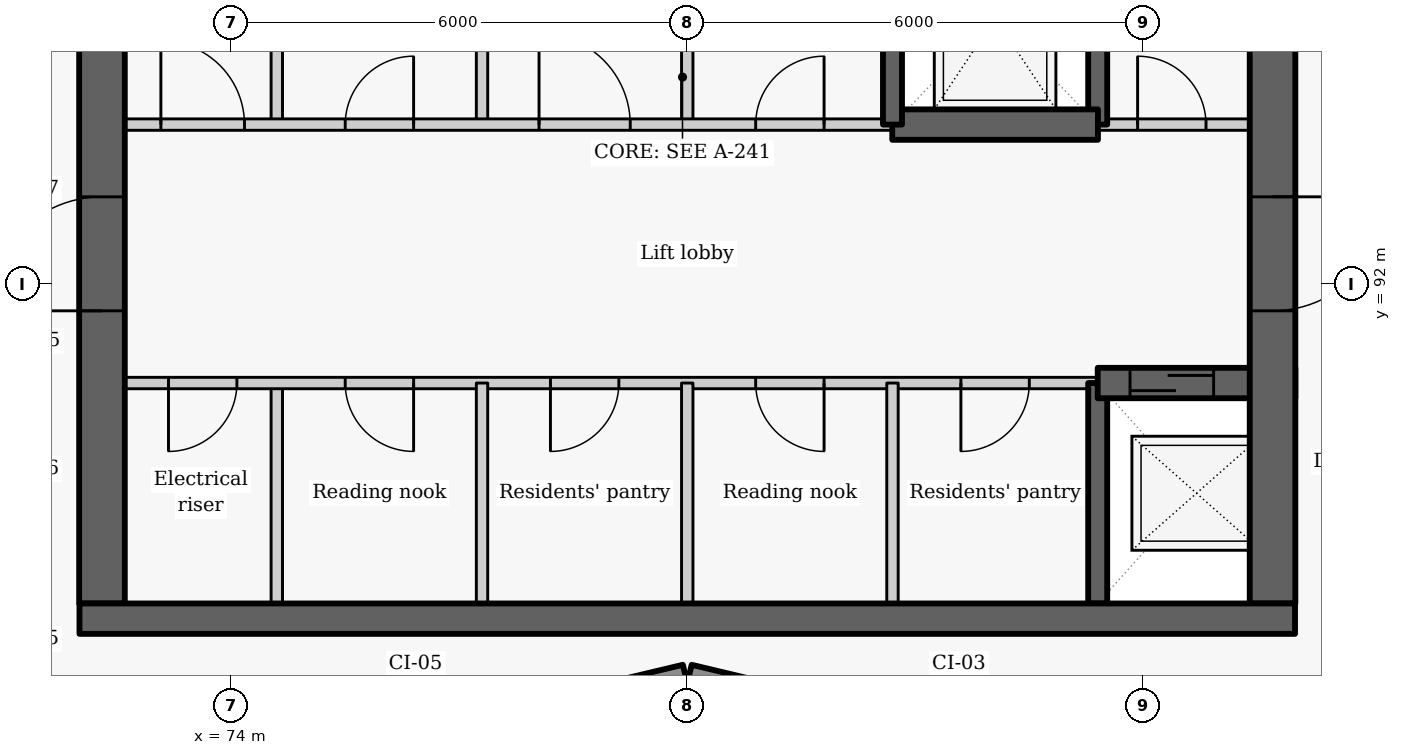
"""IFC4 building model, lengths in metres.
Left out: names, types, materials, properties, quantities, classifications, styles, units other than length and angle.
Written with IfcOpenShell. Run it as: python <this file> out.ifc"""

import sys

from ifc_helpers import new_model, si_unit, direction, frame, frame_2d, origin, place, context, subcontext, project, spatial, rectangle, extrude, element, fill, save


model = new_model("IFC4")
c1 = context("Model", 3, precision=1e-05, world=origin(), true_north=direction((0.0, 1.0)))
c2 = subcontext(c1, "Body", "Model", "MODEL_VIEW")
j1 = project(units=[si_unit("LENGTHUNIT", "METRE"), si_unit("PLANEANGLEUNIT", "RADIAN")], contexts=[c1])
p1 = place(None, origin())
s1 = spatial("IfcSite", under=j1, at=p1, CompositionType="ELEMENT")
p2 = place(p1, origin())
s2 = spatial("IfcBuilding", under=s1, at=p2, CompositionType="ELEMENT")
p3 = place(p2, frame((0.0, 0.0, 239.4)))
s3 = spatial("IfcBuildingStorey", under=s2, at=p3, CompositionType="ELEMENT", Elevation=239.4)
for number, where, z_axis, x_axis in (
    (1, (76.814, 86.119, 0.0), (0.0, 0.0, 1.0), (0.973, 0.232, 0.0)),
    (2, (80.029, 86.872, 0.0), (0.0, 0.0, 1.0), (0.973, -0.232, 0.0)),
):
    element("IfcWall", number, at=place(p3, frame(where, z_axis=z_axis, x_axis=x_axis)), inside=s3, PredefinedType="SOLIDWALL", context=c2, shape_type="SweptSolid", body=[
        extrude(rectangle(XDim=3.246, YDim=0.25, at=frame_2d((1.623, 0.0))), origin(), (0.0, 0.0, 1.0), 2.425),
    ])
p4 = place(p3, frame((74.6, 87.8, 0.0), z_axis=(0.0, 0.0, 1.0), x_axis=(0.0, 1.0, 0.0)))
e3 = element("IfcWall", 3, at=p4, inside=s3, PredefinedType="PARTITIONING", context=c2, shape_type="SweptSolid", body=[
    extrude(rectangle(XDim=2.9, YDim=0.15, at=frame_2d((1.45, 0.0))), origin(), (0.0, 0.0, 1.0), 3.025),
])
p5 = place(p3, frame((74.6, 94.1, 0.0), z_axis=(0.0, 0.0, 1.0), x_axis=(0.0, 1.0, 0.0)))
e4 = element("IfcWall", 4, at=p5, inside=s3, PredefinedType="PARTITIONING", context=c2, shape_type="SweptSolid", body=[
    extrude(rectangle(XDim=2.8, YDim=0.15, at=frame_2d((1.4, 0.0))), origin(), (0.0, 0.0, 1.0), 3.025),
])
p6 = place(p3, frame((85.4, 90.7, 0.0), z_axis=(0.0, 0.0, 1.0), x_axis=(-1.0, 0.0, 0.0)))
e5 = element("IfcWall", 5, at=p6, inside=s3, PredefinedType="PARTITIONING", context=c2, shape_type="SweptSolid", body=[
    extrude(rectangle(XDim=13.4, YDim=0.15, at=frame_2d((6.7, 0.0))), origin(), (0.0, 0.0, 1.0), 3.025),
])
p7 = place(p6, frame((11.325, 0.0, 0.0)))
e6 = element("IfcOpeningElement", 6, at=p7, cuts=e5, PredefinedType="OPENING", context=c2, shape_type="SweptSolid", body=[
    extrude(rectangle(XDim=0.9, YDim=2.1, at=frame_2d((0.45, 1.05))), frame((0.0, 0.085, 0.0), z_axis=(0.0, -1.0, 0.0), x_axis=(1.0, 0.0, 0.0)), (0.0, 0.0, 1.0), 0.17),
])
p8 = place(p6, frame((9.0, 0.0, 0.0)))
e7 = element("IfcOpeningElement", 7, at=p8, cuts=e5, PredefinedType="OPENING", context=c2, shape_type="SweptSolid", body=[
    extrude(rectangle(XDim=0.9, YDim=2.1, at=frame_2d((0.45, 1.05))), frame((0.0, 0.085, 0.0), z_axis=(0.0, -1.0, 0.0), x_axis=(1.0, 0.0, 0.0)), (0.0, 0.0, 1.0), 0.17),
])
p9 = place(p6, frame((6.3, 0.0, 0.0)))
e8 = element("IfcOpeningElement", 8, at=p9, cuts=e5, PredefinedType="OPENING", context=c2, shape_type="SweptSolid", body=[
    extrude(rectangle(XDim=0.9, YDim=2.1, at=frame_2d((0.45, 1.05))), frame((0.0, 0.085, 0.0), z_axis=(0.0, -1.0, 0.0), x_axis=(1.0, 0.0, 0.0)), (0.0, 0.0, 1.0), 0.17),
])
p10 = place(p6, frame((3.6, 0.0, 0.0)))
e9 = element("IfcOpeningElement", 9, at=p10, cuts=e5, PredefinedType="OPENING", context=c2, shape_type="SweptSolid", body=[
    extrude(rectangle(XDim=0.9, YDim=2.1, at=frame_2d((0.45, 1.05))), frame((0.0, 0.085, 0.0), z_axis=(0.0, -1.0, 0.0), x_axis=(1.0, 0.0, 0.0)), (0.0, 0.0, 1.0), 0.17),
])
p11 = place(p6, frame((0.9, 0.0, 0.0)))
e10 = element("IfcOpeningElement", 10, at=p11, cuts=e5, PredefinedType="OPENING", context=c2, shape_type="SweptSolid", body=[
    extrude(rectangle(XDim=0.9, YDim=2.1, at=frame_2d((0.45, 1.05))), frame((0.0, 0.085, 0.0), z_axis=(0.0, -1.0, 0.0), x_axis=(1.0, 0.0, 0.0)), (0.0, 0.0, 1.0), 0.17),
])
p12 = place(p3, frame((72.3, 87.8, -0.275), z_axis=(0.0, 0.0, 1.0), x_axis=(0.0, 1.0, 0.0)))
e11 = element("IfcWall", 11, at=p12, inside=s3, PredefinedType="SHEAR", context=c2, shape_type="SweptSolid", body=[
    extrude(rectangle(XDim=9.1, YDim=0.6, at=frame_2d((4.55, 0.0))), origin(), (0.0, 0.0, 1.0), 3.3),
])
p13 = place(p12, frame((3.85, 0.0, 0.275)))
e12 = element("IfcOpeningElement", 12, at=p13, cuts=e11, PredefinedType="OPENING", context=c2, shape_type="SweptSolid", body=[
    extrude(rectangle(XDim=1.5, YDim=2.1, at=frame_2d((0.75, 1.05))), frame((0.0, 0.31, 0.0), z_axis=(0.0, -1.0, 0.0), x_axis=(1.0, 0.0, 0.0)), (0.0, 0.0, 1.0), 0.62),
])
p14 = place(p3, frame((85.4, 87.8, -0.275), z_axis=(0.0, 0.0, 1.0), x_axis=(0.0, 1.0, 0.0)))
e13 = element("IfcWall", 13, at=p14, inside=s3, PredefinedType="SHEAR", context=c2, shape_type="SweptSolid", body=[
    extrude(rectangle(XDim=2.9, YDim=0.25, at=frame_2d((1.45, 0.0))), origin(), (0.0, 0.0, 1.0), 3.3),
])
p15 = place(p3, frame((85.4, 94.1, -0.275), z_axis=(0.0, 0.0, 1.0), x_axis=(0.0, 1.0, 0.0)))
e14 = element("IfcWall", 14, at=p15, inside=s3, PredefinedType="SHEAR", context=c2, shape_type="SweptSolid", body=[
    extrude(rectangle(XDim=2.8, YDim=0.25, at=frame_2d((1.4, 0.0))), origin(), (0.0, 0.0, 1.0), 3.3),
])
p16 = place(p3, frame((85.4, 90.7, -0.275), z_axis=(0.0, 0.0, 1.0), x_axis=(1.0, 0.0, 0.0)))
e15 = element("IfcWall", 15, at=p16, inside=s3, PredefinedType="SHEAR", context=c2, shape_type="SweptSolid", body=[
    extrude(rectangle(XDim=2.6, YDim=0.4, at=frame_2d((1.3, 0.0))), origin(), (0.0, 0.0, 1.0), 3.3),
])
p17 = place(p16, frame((0.425, 0.0, 0.275)))
e16 = element("IfcOpeningElement", 16, at=p17, cuts=e15, PredefinedType="OPENING", context=c2, shape_type="SweptSolid", body=[
    extrude(rectangle(XDim=1.1, YDim=2.1, at=frame_2d((0.55, 1.05))), frame((0.0, 0.21, 0.0), z_axis=(0.0, -1.0, 0.0), x_axis=(1.0, 0.0, 0.0)), (0.0, 0.0, 1.0), 0.42),
])
p18 = place(p3, frame((87.7, 102.05, -0.275), z_axis=(0.0, 0.0, 1.0), x_axis=(0.0, -1.0, 0.0)))
e17 = element("IfcWall", 17, at=p18, inside=s3, PredefinedType="SHEAR", context=c2, shape_type="SweptSolid", body=[
    extrude(rectangle(XDim=14.25, YDim=0.6, at=frame_2d((7.125, 0.0))), origin(), (0.0, 0.0, 1.0), 3.3),
])
p19 = place(p18, frame((8.9, 0.0, 0.275)))
e18 = element("IfcOpeningElement", 18, at=p19, cuts=e17, PredefinedType="OPENING", context=c2, shape_type="SweptSolid", body=[
    extrude(rectangle(XDim=1.5, YDim=2.1, at=frame_2d((0.75, 1.05))), frame((0.0, 0.31, 0.0), z_axis=(0.0, -1.0, 0.0), x_axis=(1.0, 0.0, 0.0)), (0.0, 0.0, 1.0), 0.62),
])
p20 = place(p18, frame((2.025, 0.0, 0.275)))
e19 = element("IfcOpeningElement", 19, at=p20, cuts=e17, PredefinedType="OPENING", context=c2, shape_type="SweptSolid", body=[
    extrude(rectangle(XDim=1.1, YDim=2.1, at=frame_2d((0.55, 1.05))), frame((0.0, 0.31, 0.0), z_axis=(0.0, -1.0, 0.0), x_axis=(1.0, 0.0, 0.0)), (0.0, 0.0, 1.0), 0.62),
])
p21 = place(p3, frame((77.3, 87.8, 0.0), z_axis=(0.0, 0.0, 1.0), x_axis=(0.0, 1.0, 0.0)))
e20 = element("IfcWall", 20, at=p21, inside=s3, PredefinedType="PARTITIONING", context=c2, shape_type="SweptSolid", body=[
    extrude(rectangle(XDim=2.9, YDim=0.15, at=frame_2d((1.45, 0.0))), origin(), (0.0, 0.0, 1.0), 3.025),
])
p22 = place(p3, frame((77.3, 94.1, 0.0), z_axis=(0.0, 0.0, 1.0), x_axis=(0.0, 1.0, 0.0)))
e21 = element("IfcWall", 21, at=p22, inside=s3, PredefinedType="PARTITIONING", context=c2, shape_type="SweptSolid", body=[
    extrude(rectangle(XDim=2.8, YDim=0.15, at=frame_2d((1.4, 0.0))), origin(), (0.0, 0.0, 1.0), 3.025),
])
p23 = place(p3, frame((80.0, 87.8, 0.0), z_axis=(0.0, 0.0, 1.0), x_axis=(0.0, 1.0, 0.0)))
e22 = element("IfcWall", 22, at=p23, inside=s3, PredefinedType="PARTITIONING", context=c2, shape_type="SweptSolid", body=[
    extrude(rectangle(XDim=2.9, YDim=0.15, at=frame_2d((1.45, 0.0))), origin(), (0.0, 0.0, 1.0), 3.025),
])
p24 = place(p3, frame((80.0, 94.1, 0.0), z_axis=(0.0, 0.0, 1.0), x_axis=(0.0, 1.0, 0.0)))
e23 = element("IfcWall", 23, at=p24, inside=s3, PredefinedType="PARTITIONING", context=c2, shape_type="SweptSolid", body=[
    extrude(rectangle(XDim=2.8, YDim=0.15, at=frame_2d((1.4, 0.0))), origin(), (0.0, 0.0, 1.0), 3.025),
])
p25 = place(p3, frame((82.7, 87.8, 0.0), z_axis=(0.0, 0.0, 1.0), x_axis=(0.0, 1.0, 0.0)))
e24 = element("IfcWall", 24, at=p25, inside=s3, PredefinedType="PARTITIONING", context=c2, shape_type="SweptSolid", body=[
    extrude(rectangle(XDim=2.9, YDim=0.15, at=frame_2d((1.45, 0.0))), origin(), (0.0, 0.0, 1.0), 3.025),
])
p26 = place(p3, frame((72.0, 94.1, 0.0), z_axis=(0.0, 0.0, 1.0), x_axis=(1.0, 0.0, 0.0)))
e25 = element("IfcWall", 25, at=p26, inside=s3, PredefinedType="PARTITIONING", context=c2, shape_type="SweptSolid", body=[
    extrude(rectangle(XDim=10.703, YDim=0.15, at=frame_2d((5.352, 0.0))), origin(), (0.0, 0.0, 1.0), 3.025),
])
p27 = place(p26, frame((1.075, 0.0, 0.0)))
e26 = element("IfcOpeningElement", 26, at=p27, cuts=e25, PredefinedType="OPENING", context=c2, shape_type="SweptSolid", body=[
    extrude(rectangle(XDim=1.1, YDim=2.1, at=frame_2d((0.55, 1.05))), frame((0.0, 0.085, 0.0), z_axis=(0.0, -1.0, 0.0), x_axis=(1.0, 0.0, 0.0)), (0.0, 0.0, 1.0), 0.17),
])
p28 = place(p26, frame((3.5, 0.0, 0.0)))
e27 = element("IfcOpeningElement", 27, at=p28, cuts=e25, PredefinedType="OPENING", context=c2, shape_type="SweptSolid", body=[
    extrude(rectangle(XDim=0.9, YDim=2.1, at=frame_2d((0.45, 1.05))), frame((0.0, 0.085, 0.0), z_axis=(0.0, -1.0, 0.0), x_axis=(1.0, 0.0, 0.0)), (0.0, 0.0, 1.0), 0.17),
])
p29 = place(p26, frame((6.05, 0.0, 0.0)))
e28 = element("IfcOpeningElement", 28, at=p29, cuts=e25, PredefinedType="OPENING", context=c2, shape_type="SweptSolid", body=[
    extrude(rectangle(XDim=1.2, YDim=2.1, at=frame_2d((0.6, 1.05))), frame((0.0, 0.085, 0.0), z_axis=(0.0, -1.0, 0.0), x_axis=(1.0, 0.0, 0.0)), (0.0, 0.0, 1.0), 0.17),
])
p30 = place(p26, frame((8.9, 0.0, 0.0)))
e29 = element("IfcOpeningElement", 29, at=p30, cuts=e25, PredefinedType="OPENING", context=c2, shape_type="SweptSolid", body=[
    extrude(rectangle(XDim=0.9, YDim=2.1, at=frame_2d((0.45, 1.05))), frame((0.0, 0.085, 0.0), z_axis=(0.0, -1.0, 0.0), x_axis=(1.0, 0.0, 0.0)), (0.0, 0.0, 1.0), 0.17),
])
p31 = place(p3, frame((85.397, 94.1, 0.0), z_axis=(0.0, 0.0, 1.0), x_axis=(1.0, 0.0, 0.0)))
e30 = element("IfcWall", 30, at=p31, inside=s3, PredefinedType="PARTITIONING", context=c2, shape_type="SweptSolid", body=[
    extrude(rectangle(XDim=2.603, YDim=0.15, at=frame_2d((1.302, 0.0))), origin(), (0.0, 0.0, 1.0), 3.025),
])
p32 = place(p31, frame((0.528, 0.0, 0.0)))
e31 = element("IfcOpeningElement", 31, at=p32, cuts=e30, PredefinedType="OPENING", context=c2, shape_type="SweptSolid", body=[
    extrude(rectangle(XDim=0.9, YDim=2.1, at=frame_2d((0.45, 1.05))), frame((0.0, 0.085, 0.0), z_axis=(0.0, -1.0, 0.0), x_axis=(1.0, 0.0, 0.0)), (0.0, 0.0, 1.0), 0.17),
])
p33 = place(p3, frame((82.697, 94.1, -0.275), z_axis=(0.0, 0.0, 1.0), x_axis=(1.0, 0.0, 0.0)))
e32 = element("IfcWall", 32, at=p33, inside=s3, PredefinedType="SHEAR", context=c2, shape_type="SweptSolid", body=[
    extrude(rectangle(XDim=2.706, YDim=0.4, at=frame_2d((1.353, 0.0))), origin(), (0.0, 0.0, 1.0), 3.3),
])
p34 = place(p3, frame((82.7, 94.1, -0.275), z_axis=(0.0, 0.0, 1.0), x_axis=(0.0, 1.0, 0.0)))
e33 = element("IfcWall", 33, at=p34, inside=s3, PredefinedType="SHEAR", context=c2, shape_type="SweptSolid", body=[
    extrude(rectangle(XDim=2.8, YDim=0.25, at=frame_2d((1.4, 0.0))), origin(), (0.0, 0.0, 1.0), 3.3),
])
p35 = place(p3, frame((72.004, 87.6, -0.275), z_axis=(0.0, 0.0, 1.0), x_axis=(1.0, 0.0, 0.0)))
e34 = element("IfcWall", 34, at=p35, inside=s3, PredefinedType="SHEAR", context=c2, shape_type="SweptSolid", body=[
    extrude(rectangle(XDim=15.992, YDim=0.4, at=frame_2d((7.996, 0.0))), origin(), (0.0, 0.0, 1.0), 3.3),
])
p36 = place(p7, origin())
e35 = element("IfcDoor", 35, at=p36, inside=s3, OperationType="SINGLE_SWING_RIGHT", PredefinedType="DOOR", context=c2, shape_type="SweptSolid", body=[
    extrude(rectangle(XDim=0.9, YDim=2.1, at=frame_2d((0.45, 1.05))), frame((0.0, 0.025, 0.0), z_axis=(0.0, -1.0, 0.0), x_axis=(1.0, 0.0, 0.0)), (0.0, 0.0, 1.0), 0.05),
])
fill(e6, e35)
p37 = place(p17, origin())
e36 = element("IfcDoor", 36, at=p37, inside=s3, OperationType="SLIDING_TO_LEFT", PredefinedType="DOOR", context=c2, shape_type="SweptSolid", body=[
    extrude(rectangle(XDim=1.1, YDim=2.1, at=frame_2d((0.55, 1.05))), frame((0.0, 0.025, 0.0), z_axis=(0.0, -1.0, 0.0), x_axis=(1.0, 0.0, 0.0)), (0.0, 0.0, 1.0), 0.05),
])
fill(e16, e36)
p38 = place(p8, origin())
e37 = element("IfcDoor", 37, at=p38, inside=s3, OperationType="SINGLE_SWING_LEFT", PredefinedType="DOOR", context=c2, shape_type="SweptSolid", body=[
    extrude(rectangle(XDim=0.9, YDim=2.1, at=frame_2d((0.45, 1.05))), frame((0.0, 0.025, 0.0), z_axis=(0.0, -1.0, 0.0), x_axis=(1.0, 0.0, 0.0)), (0.0, 0.0, 1.0), 0.05),
])
fill(e7, e37)
p39 = place(p9, origin())
e38 = element("IfcDoor", 38, at=p39, inside=s3, OperationType="SINGLE_SWING_RIGHT", PredefinedType="DOOR", context=c2, shape_type="SweptSolid", body=[
    extrude(rectangle(XDim=0.9, YDim=2.1, at=frame_2d((0.45, 1.05))), frame((0.0, 0.025, 0.0), z_axis=(0.0, -1.0, 0.0), x_axis=(1.0, 0.0, 0.0)), (0.0, 0.0, 1.0), 0.05),
])
fill(e8, e38)
p40 = place(p10, origin())
e39 = element("IfcDoor", 39, at=p40, inside=s3, OperationType="SINGLE_SWING_LEFT", PredefinedType="DOOR", context=c2, shape_type="SweptSolid", body=[
    extrude(rectangle(XDim=0.9, YDim=2.1, at=frame_2d((0.45, 1.05))), frame((0.0, 0.025, 0.0), z_axis=(0.0, -1.0, 0.0), x_axis=(1.0, 0.0, 0.0)), (0.0, 0.0, 1.0), 0.05),
])
fill(e9, e39)
p41 = place(p11, origin())
e40 = element("IfcDoor", 40, at=p41, inside=s3, OperationType="SINGLE_SWING_RIGHT", PredefinedType="DOOR", context=c2, shape_type="SweptSolid", body=[
    extrude(rectangle(XDim=0.9, YDim=2.1, at=frame_2d((0.45, 1.05))), frame((0.0, 0.025, 0.0), z_axis=(0.0, -1.0, 0.0), x_axis=(1.0, 0.0, 0.0)), (0.0, 0.0, 1.0), 0.05),
])
fill(e10, e40)
p42 = place(p27, origin())
e41 = element("IfcDoor", 41, at=p42, inside=s3, OperationType="SINGLE_SWING_LEFT", PredefinedType="DOOR", context=c2, shape_type="SweptSolid", body=[
    extrude(rectangle(XDim=1.1, YDim=2.1, at=frame_2d((0.55, 1.05))), frame((0.0, 0.025, 0.0), z_axis=(0.0, -1.0, 0.0), x_axis=(1.0, 0.0, 0.0)), (0.0, 0.0, 1.0), 0.05),
])
fill(e26, e41)
p43 = place(p28, origin())
e42 = element("IfcDoor", 42, at=p43, inside=s3, OperationType="SINGLE_SWING_RIGHT", PredefinedType="DOOR", context=c2, shape_type="SweptSolid", body=[
    extrude(rectangle(XDim=0.9, YDim=2.1, at=frame_2d((0.45, 1.05))), frame((0.0, 0.025, 0.0), z_axis=(0.0, -1.0, 0.0), x_axis=(1.0, 0.0, 0.0)), (0.0, 0.0, 1.0), 0.05),
])
fill(e27, e42)
p44 = place(p29, origin())
e43 = element("IfcDoor", 43, at=p44, inside=s3, OperationType="DOUBLE_DOOR_SINGLE_SWING", PredefinedType="DOOR", context=c2, shape_type="SweptSolid", body=[
    extrude(rectangle(XDim=1.2, YDim=2.1, at=frame_2d((0.6, 1.05))), frame((0.0, 0.025, 0.0), z_axis=(0.0, -1.0, 0.0), x_axis=(1.0, 0.0, 0.0)), (0.0, 0.0, 1.0), 0.05),
])
fill(e28, e43)
p45 = place(p30, origin())
e44 = element("IfcDoor", 44, at=p45, inside=s3, OperationType="SINGLE_SWING_RIGHT", PredefinedType="DOOR", context=c2, shape_type="SweptSolid", body=[
    extrude(rectangle(XDim=0.9, YDim=2.1, at=frame_2d((0.45, 1.05))), frame((0.0, 0.025, 0.0), z_axis=(0.0, -1.0, 0.0), x_axis=(1.0, 0.0, 0.0)), (0.0, 0.0, 1.0), 0.05),
])
fill(e29, e44)
p46 = place(p32, origin())
e45 = element("IfcDoor", 45, at=p46, inside=s3, OperationType="SINGLE_SWING_LEFT", PredefinedType="DOOR", context=c2, shape_type="SweptSolid", body=[
    extrude(rectangle(XDim=0.9, YDim=2.1, at=frame_2d((0.45, 1.05))), frame((0.0, 0.025, 0.0), z_axis=(0.0, -1.0, 0.0), x_axis=(1.0, 0.0, 0.0)), (0.0, 0.0, 1.0), 0.05),
])
fill(e31, e45)
p47 = place(p19, origin())
e46 = element("IfcDoor", 46, at=p47, inside=s3, OperationType="DOUBLE_DOOR_SINGLE_SWING", PredefinedType="DOOR", context=c2, shape_type="SweptSolid", body=[
    extrude(rectangle(XDim=1.5, YDim=2.1, at=frame_2d((0.75, 1.05))), frame((0.0, 0.025, 0.0), z_axis=(0.0, -1.0, 0.0), x_axis=(1.0, 0.0, 0.0)), (0.0, 0.0, 1.0), 0.05),
])
fill(e18, e46)
p48 = place(p13, origin())
e47 = element("IfcDoor", 47, at=p48, inside=s3, OperationType="DOUBLE_DOOR_SINGLE_SWING", PredefinedType="DOOR", context=c2, shape_type="SweptSolid", body=[
    extrude(rectangle(XDim=1.5, YDim=2.1, at=frame_2d((0.75, 1.05))), frame((0.0, 0.025, 0.0), z_axis=(0.0, -1.0, 0.0), x_axis=(1.0, 0.0, 0.0)), (0.0, 0.0, 1.0), 0.05),
])
fill(e12, e47)
save(model, sys.argv[1])
